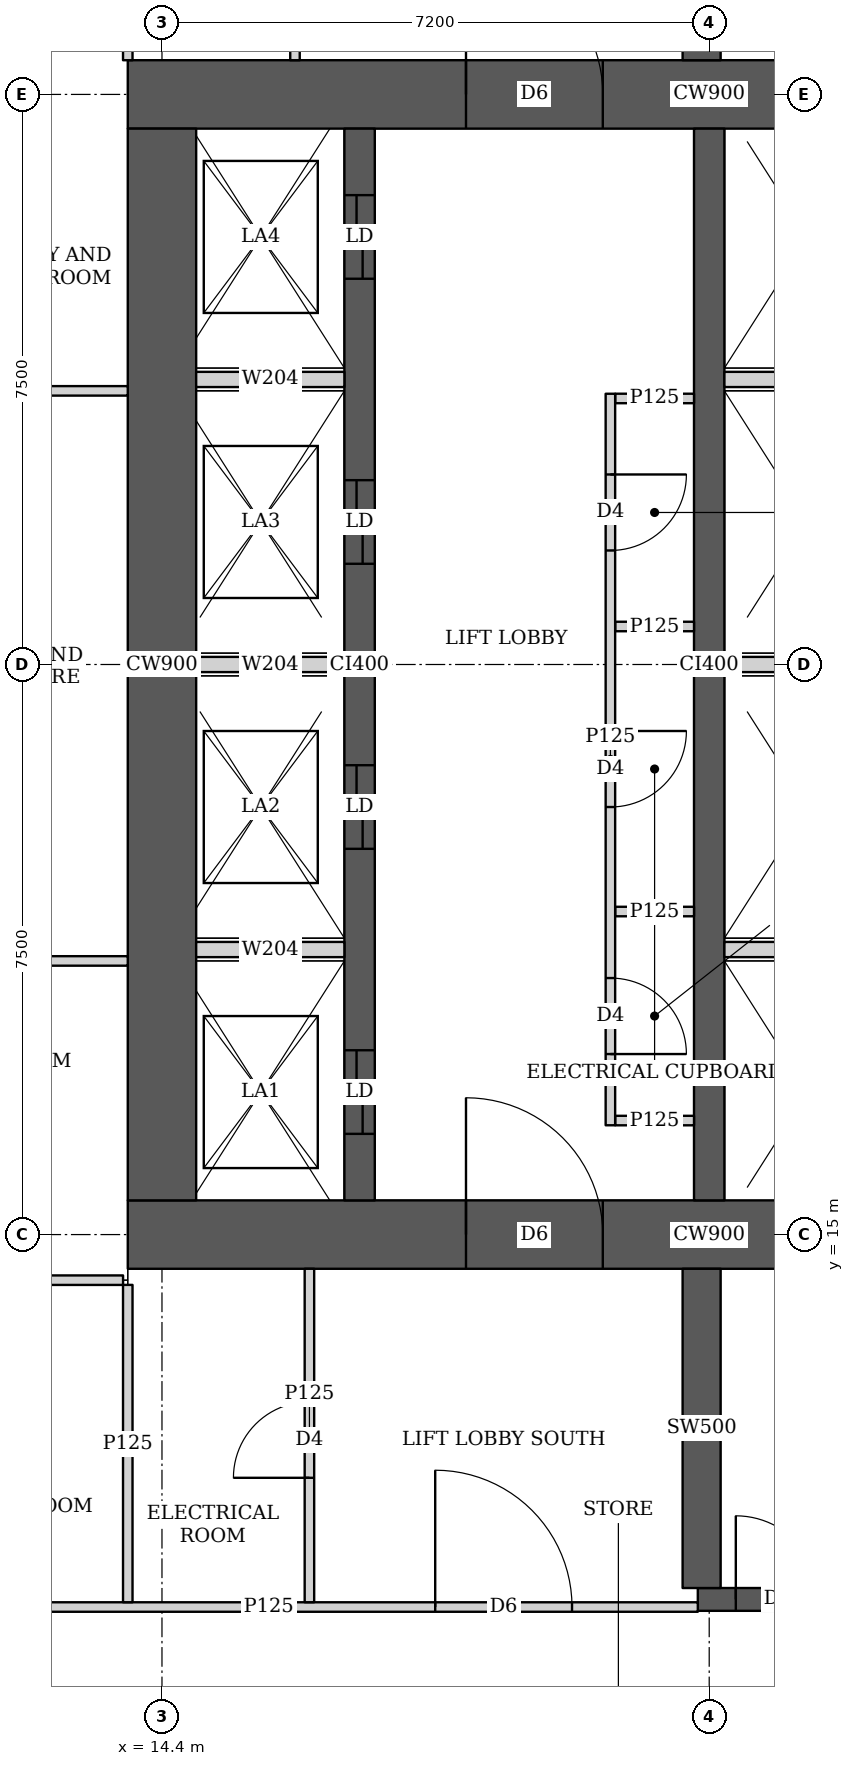
"""IFC4 building model, lengths in metres.
Left out: names, types, materials, properties, quantities, classifications, styles, units other than length and angle.
Written with IfcOpenShell. Run it as: python <this file> out.ifc"""

import sys

from ifc_helpers import new_model, si_unit, direction, frame, frame_2d, origin, place, context, subcontext, project, spatial, rectangle, extrude, element, fill, save


model = new_model("IFC4")
c1 = context("Model", 3, precision=1e-05, world=origin(), true_north=direction((0.0, 1.0)))
c2 = subcontext(c1, "Body", "Model", "MODEL_VIEW")
j1 = project(units=[si_unit("LENGTHUNIT", "METRE"), si_unit("PLANEANGLEUNIT", "RADIAN")], contexts=[c1])
p1 = place(None, origin())
s1 = spatial("IfcSite", under=j1, at=p1, CompositionType="ELEMENT")
p2 = place(p1, origin())
s2 = spatial("IfcBuilding", under=s1, at=p2, CompositionType="ELEMENT")
p3 = place(p2, frame((0.0, 0.0, 77.9)))
s3 = spatial("IfcBuildingStorey", under=s2, at=p3, CompositionType="ELEMENT", Elevation=77.9)
p4 = place(p3, frame((13.95, 15.0, 0.0), z_axis=(0.0, 0.0, 1.0), x_axis=(1.0, 0.0, 0.0)))
e1 = element("IfcWall", 1, at=p4, inside=s3, PredefinedType="SHEAR", context=c2, shape_type="SweptSolid", body=[
    extrude(rectangle(XDim=15.3, YDim=0.9, at=frame_2d((7.65, 0.0))), origin(), (0.0, 0.0, 1.0), 3.75),
])
p5 = place(p4, frame((4.45, 0.0, 0.0)))
e2 = element("IfcOpeningElement", 2, at=p5, cuts=e1, PredefinedType="OPENING", context=c2, shape_type="SweptSolid", body=[
    extrude(rectangle(XDim=1.8, YDim=2.1, at=frame_2d((0.9, 1.05))), frame((0.0, 0.46, 0.0), z_axis=(0.0, -1.0, 0.0), x_axis=(1.0, 0.0, 0.0)), (0.0, 0.0, 1.0), 0.92),
])
p6 = place(p4, frame((10.7, 0.0, 0.0)))
e3 = element("IfcOpeningElement", 3, at=p6, cuts=e1, PredefinedType="OPENING", context=c2, shape_type="SweptSolid", body=[
    extrude(rectangle(XDim=1.1, YDim=2.1, at=frame_2d((0.55, 1.05))), frame((0.0, 0.46, 0.0), z_axis=(0.0, -1.0, 0.0), x_axis=(1.0, 0.0, 0.0)), (0.0, 0.0, 1.0), 0.92),
])
p7 = place(p3, frame((13.95, 30.0, 0.0), z_axis=(0.0, 0.0, 1.0), x_axis=(1.0, 0.0, 0.0)))
e4 = element("IfcWall", 4, at=p7, inside=s3, PredefinedType="SHEAR", context=c2, shape_type="SweptSolid", body=[
    extrude(rectangle(XDim=15.3, YDim=0.9, at=frame_2d((7.65, 0.0))), origin(), (0.0, 0.0, 1.0), 3.75),
])
p8 = place(p7, frame((4.45, 0.0, 0.0)))
e5 = element("IfcOpeningElement", 5, at=p8, cuts=e4, PredefinedType="OPENING", context=c2, shape_type="SweptSolid", body=[
    extrude(rectangle(XDim=1.8, YDim=2.1, at=frame_2d((0.9, 1.05))), frame((0.0, 0.46, 0.0), z_axis=(0.0, -1.0, 0.0), x_axis=(1.0, 0.0, 0.0)), (0.0, 0.0, 1.0), 0.92),
])
p9 = place(p7, frame((10.7, 0.0, 0.0)))
e6 = element("IfcOpeningElement", 6, at=p9, cuts=e4, PredefinedType="OPENING", context=c2, shape_type="SweptSolid", body=[
    extrude(rectangle(XDim=1.1, YDim=2.1, at=frame_2d((0.55, 1.05))), frame((0.0, 0.46, 0.0), z_axis=(0.0, -1.0, 0.0), x_axis=(1.0, 0.0, 0.0)), (0.0, 0.0, 1.0), 0.92),
])
p10 = place(p3, frame((14.4, 15.45, 0.0), z_axis=(0.0, 0.0, 1.0), x_axis=(0.0, 1.0, 0.0)))
e7 = element("IfcWall", 7, at=p10, inside=s3, PredefinedType="SHEAR", context=c2, shape_type="SweptSolid", body=[
    extrude(rectangle(XDim=14.1, YDim=0.9, at=frame_2d((7.05, 0.0))), origin(), (0.0, 0.0, 1.0), 3.75),
])
p11 = place(p3, frame((17.0, 15.45, 0.0), z_axis=(0.0, 0.0, 1.0), x_axis=(0.0, 1.0, 0.0)))
e8 = element("IfcWall", 8, at=p11, inside=s3, PredefinedType="SHEAR", context=c2, shape_type="SweptSolid", body=[
    extrude(rectangle(XDim=14.1, YDim=0.4, at=frame_2d((7.05, 0.0))), origin(), (0.0, 0.0, 1.0), 3.75),
])
p12 = place(p11, frame((0.875, 0.0, 0.0)))
e9 = element("IfcOpeningElement", 9, at=p12, cuts=e8, PredefinedType="OPENING", context=c2, shape_type="SweptSolid", body=[
    extrude(rectangle(XDim=1.1, YDim=2.1, at=frame_2d((0.55, 1.05))), frame((0.0, 0.21, 0.0), z_axis=(0.0, -1.0, 0.0), x_axis=(1.0, 0.0, 0.0)), (0.0, 0.0, 1.0), 0.42),
])
p13 = place(p11, frame((4.625, 0.0, 0.0)))
e10 = element("IfcOpeningElement", 10, at=p13, cuts=e8, PredefinedType="OPENING", context=c2, shape_type="SweptSolid", body=[
    extrude(rectangle(XDim=1.1, YDim=2.1, at=frame_2d((0.55, 1.05))), frame((0.0, 0.21, 0.0), z_axis=(0.0, -1.0, 0.0), x_axis=(1.0, 0.0, 0.0)), (0.0, 0.0, 1.0), 0.42),
])
p14 = place(p11, frame((8.375, 0.0, 0.0)))
e11 = element("IfcOpeningElement", 11, at=p14, cuts=e8, PredefinedType="OPENING", context=c2, shape_type="SweptSolid", body=[
    extrude(rectangle(XDim=1.1, YDim=2.1, at=frame_2d((0.55, 1.05))), frame((0.0, 0.21, 0.0), z_axis=(0.0, -1.0, 0.0), x_axis=(1.0, 0.0, 0.0)), (0.0, 0.0, 1.0), 0.42),
])
p15 = place(p11, frame((12.125, 0.0, 0.0)))
e12 = element("IfcOpeningElement", 12, at=p15, cuts=e8, PredefinedType="OPENING", context=c2, shape_type="SweptSolid", body=[
    extrude(rectangle(XDim=1.1, YDim=2.1, at=frame_2d((0.55, 1.05))), frame((0.0, 0.21, 0.0), z_axis=(0.0, -1.0, 0.0), x_axis=(1.0, 0.0, 0.0)), (0.0, 0.0, 1.0), 0.42),
])
p16 = place(p3, frame((21.6, 15.45, 0.0), z_axis=(0.0, 0.0, 1.0), x_axis=(0.0, 1.0, 0.0)))
e13 = element("IfcWall", 13, at=p16, inside=s3, PredefinedType="SHEAR", context=c2, shape_type="SweptSolid", body=[
    extrude(rectangle(XDim=14.1, YDim=0.4, at=frame_2d((7.05, 0.0))), origin(), (0.0, 0.0, 1.0), 3.75),
])
p17 = place(p3, frame((21.45, 10.2, 0.0), z_axis=(0.0, 0.0, 1.0), x_axis=(1.0, 0.0, 0.0)))
e14 = element("IfcWall", 14, at=p17, inside=s3, PredefinedType="SHEAR", context=c2, shape_type="SweptSolid", body=[
    extrude(rectangle(XDim=7.5, YDim=0.3, at=frame_2d((3.75, 0.0))), origin(), (0.0, 0.0, 1.0), 3.75),
])
p18 = place(p17, frame((0.5, 0.0, 0.0)))
e15 = element("IfcOpeningElement", 15, at=p18, cuts=e14, PredefinedType="OPENING", context=c2, shape_type="SweptSolid", body=[
    extrude(rectangle(XDim=1.1, YDim=2.1, at=frame_2d((0.55, 1.05))), frame((0.0, 0.16, 0.0), z_axis=(0.0, -1.0, 0.0), x_axis=(1.0, 0.0, 0.0)), (0.0, 0.0, 1.0), 0.32),
])
for number, where, z_axis, x_axis in (
    (16, (21.5, 10.35, 0.0), (0.0, 0.0, 1.0), (0.0, 1.0, 0.0)),
    (17, (21.5, 30.45, 0.0), (0.0, 0.0, 1.0), (0.0, 1.0, 0.0)),
):
    element("IfcWall", number, at=place(p3, frame(where, z_axis=z_axis, x_axis=x_axis)), inside=s3, PredefinedType="SHEAR", context=c2, shape_type="SweptSolid", body=[
        extrude(rectangle(XDim=4.2, YDim=0.5, at=frame_2d((2.1, 0.0))), origin(), (0.0, 0.0, 1.0), 3.75),
    ])
p19 = place(p3, frame((10.163, 14.4, 0.0), z_axis=(0.0, 0.0, 1.0), x_axis=(1.0, 0.0, 0.0)))
e18 = element("IfcWall", 18, at=p19, inside=s3, PredefinedType="PARTITIONING", context=c2, shape_type="SweptSolid", body=[
    extrude(rectangle(XDim=3.725, YDim=0.125, at=frame_2d((1.862, 0.0))), origin(), (0.0, 0.0, 1.0), 3.5),
])
for number, where, z_axis, x_axis in (
    (19, (10.163, 18.6, 0.0), (0.0, 0.0, 1.0), (1.0, 0.0, 0.0)),
    (20, (10.163, 26.1, 0.0), (0.0, 0.0, 1.0), (1.0, 0.0, 0.0)),
):
    element("IfcWall", number, at=place(p3, frame(where, z_axis=z_axis, x_axis=x_axis)), inside=s3, PredefinedType="PARTITIONING", context=c2, shape_type="SweptSolid", body=[
        extrude(rectangle(XDim=3.787, YDim=0.125, at=frame_2d((1.894, 0.0))), origin(), (0.0, 0.0, 1.0), 3.5),
    ])
p20 = place(p3, frame((13.95, 10.163, 0.0), z_axis=(0.0, 0.0, 1.0), x_axis=(0.0, 1.0, 0.0)))
e21 = element("IfcWall", 21, at=p20, inside=s3, PredefinedType="PARTITIONING", context=c2, shape_type="SweptSolid", body=[
    extrude(rectangle(XDim=4.175, YDim=0.125, at=frame_2d((2.087, 0.0))), origin(), (0.0, 0.0, 1.0), 3.5),
])
p21 = place(p3, frame((13.95, 30.45, 0.0), z_axis=(0.0, 0.0, 1.0), x_axis=(0.0, 1.0, 0.0)))
e22 = element("IfcWall", 22, at=p21, inside=s3, PredefinedType="PARTITIONING", context=c2, shape_type="SweptSolid", body=[
    extrude(rectangle(XDim=4.387, YDim=0.125, at=frame_2d((2.193, 0.0))), origin(), (0.0, 0.0, 1.0), 3.5),
])
p22 = place(p3, frame((10.163, 10.1, 0.0), z_axis=(0.0, 0.0, 1.0), x_axis=(1.0, 0.0, 0.0)))
e23 = element("IfcWall", 23, at=p22, inside=s3, PredefinedType="PARTITIONING", context=c2, shape_type="SweptSolid", body=[
    extrude(rectangle(XDim=11.287, YDim=0.125, at=frame_2d((5.644, 0.0))), origin(), (0.0, 0.0, 1.0), 3.5),
])
p23 = place(p22, frame((7.832, 0.0, 0.0)))
e24 = element("IfcOpeningElement", 24, at=p23, cuts=e23, PredefinedType="OPENING", context=c2, shape_type="SweptSolid", body=[
    extrude(rectangle(XDim=1.8, YDim=2.1, at=frame_2d((0.9, 1.05))), frame((0.0, 0.073, 0.0), z_axis=(0.0, -1.0, 0.0), x_axis=(1.0, 0.0, 0.0)), (0.0, 0.0, 1.0), 0.145),
])
p24 = place(p3, frame((16.34, 10.163, 0.0), z_axis=(0.0, 0.0, 1.0), x_axis=(0.0, 1.0, 0.0)))
e25 = element("IfcWall", 25, at=p24, inside=s3, PredefinedType="PARTITIONING", context=c2, shape_type="SweptSolid", body=[
    extrude(rectangle(XDim=4.387, YDim=0.125, at=frame_2d((2.193, 0.0))), origin(), (0.0, 0.0, 1.0), 3.5),
])
p25 = place(p24, frame((1.637, 0.0, 0.0)))
e26 = element("IfcOpeningElement", 26, at=p25, cuts=e25, PredefinedType="OPENING", context=c2, shape_type="SweptSolid", body=[
    extrude(rectangle(XDim=1.0, YDim=2.1, at=frame_2d((0.5, 1.05))), frame((0.0, 0.073, 0.0), z_axis=(0.0, -1.0, 0.0), x_axis=(1.0, 0.0, 0.0)), (0.0, 0.0, 1.0), 0.145),
])
p26 = place(p3, frame((16.15, 30.45, 0.0), z_axis=(0.0, 0.0, 1.0), x_axis=(0.0, 1.0, 0.0)))
e27 = element("IfcWall", 27, at=p26, inside=s3, PredefinedType="PARTITIONING", context=c2, shape_type="SweptSolid", body=[
    extrude(rectangle(XDim=4.387, YDim=0.125, at=frame_2d((2.193, 0.0))), origin(), (0.0, 0.0, 1.0), 3.5),
])
p27 = place(p26, frame((1.75, 0.0, 0.0)))
e28 = element("IfcOpeningElement", 28, at=p27, cuts=e27, PredefinedType="OPENING", context=c2, shape_type="SweptSolid", body=[
    extrude(rectangle(XDim=1.0, YDim=2.1, at=frame_2d((0.5, 1.05))), frame((0.0, 0.073, 0.0), z_axis=(0.0, -1.0, 0.0), x_axis=(1.0, 0.0, 0.0)), (0.0, 0.0, 1.0), 0.145),
])
p28 = place(p3, frame((20.3, 16.438, 0.0), z_axis=(0.0, 0.0, 1.0), x_axis=(0.0, 1.0, 0.0)))
e29 = element("IfcWall", 29, at=p28, inside=s3, PredefinedType="PARTITIONING", context=c2, shape_type="SweptSolid", body=[
    extrude(rectangle(XDim=9.624, YDim=0.125, at=frame_2d((4.812, 0.0))), origin(), (0.0, 0.0, 1.0), 3.5),
])
p29 = place(p28, frame((0.937, 0.0, 0.0)))
e30 = element("IfcOpeningElement", 30, at=p29, cuts=e29, PredefinedType="OPENING", context=c2, shape_type="SweptSolid", body=[
    extrude(rectangle(XDim=1.0, YDim=2.1, at=frame_2d((0.5, 1.05))), frame((0.0, 0.073, 0.0), z_axis=(0.0, -1.0, 0.0), x_axis=(1.0, 0.0, 0.0)), (0.0, 0.0, 1.0), 0.145),
])
p30 = place(p28, frame((4.187, 0.0, 0.0)))
e31 = element("IfcOpeningElement", 31, at=p30, cuts=e29, PredefinedType="OPENING", context=c2, shape_type="SweptSolid", body=[
    extrude(rectangle(XDim=1.0, YDim=2.1, at=frame_2d((0.5, 1.05))), frame((0.0, 0.073, 0.0), z_axis=(0.0, -1.0, 0.0), x_axis=(1.0, 0.0, 0.0)), (0.0, 0.0, 1.0), 0.145),
])
p31 = place(p28, frame((7.562, 0.0, 0.0)))
e32 = element("IfcOpeningElement", 32, at=p31, cuts=e29, PredefinedType="OPENING", context=c2, shape_type="SweptSolid", body=[
    extrude(rectangle(XDim=1.0, YDim=2.1, at=frame_2d((0.5, 1.05))), frame((0.0, 0.073, 0.0), z_axis=(0.0, -1.0, 0.0), x_axis=(1.0, 0.0, 0.0)), (0.0, 0.0, 1.0), 0.145),
])
for number, where, z_axis, x_axis in (
    (33, (20.363, 16.5, 0.0), (0.0, 0.0, 1.0), (1.0, 0.0, 0.0)),
    (34, (20.363, 26.0, 0.0), (0.0, 0.0, 1.0), (1.0, 0.0, 0.0)),
    (35, (20.363, 19.25, 0.0), (0.0, 0.0, 1.0), (1.0, 0.0, 0.0)),
    (36, (20.363, 23.0, 0.0), (0.0, 0.0, 1.0), (1.0, 0.0, 0.0)),
):
    element("IfcWall", number, at=place(p3, frame(where, z_axis=z_axis, x_axis=x_axis)), inside=s3, PredefinedType="PARTITIONING", context=c2, shape_type="SweptSolid", body=[
        extrude(rectangle(XDim=1.037, YDim=0.125, at=frame_2d((0.519, 0.0))), origin(), (0.0, 0.0, 1.0), 3.5),
    ])
p32 = place(p3, frame((14.85, 18.75, 0.0), z_axis=(0.0, 0.0, 1.0), x_axis=(1.0, 0.0, 0.0)))
e37 = element("IfcWall", 37, at=p32, inside=s3, PredefinedType="SOLIDWALL", context=c2, shape_type="SweptSolid", body=[
    extrude(rectangle(XDim=1.95, YDim=0.2, at=frame_2d((0.975, 0.0))), origin(), (0.0, 0.0, 1.0), 3.5),
])
p33 = place(p3, frame((21.8, 18.75, 0.0), z_axis=(0.0, 0.0, 1.0), x_axis=(1.0, 0.0, 0.0)))
e38 = element("IfcWall", 38, at=p33, inside=s3, PredefinedType="SOLIDWALL", context=c2, shape_type="SweptSolid", body=[
    extrude(rectangle(XDim=2.2, YDim=0.2, at=frame_2d((1.1, 0.0))), origin(), (0.0, 0.0, 1.0), 3.5),
])
p34 = place(p3, frame((14.85, 22.5, 0.0), z_axis=(0.0, 0.0, 1.0), x_axis=(1.0, 0.0, 0.0)))
e39 = element("IfcWall", 39, at=p34, inside=s3, PredefinedType="SOLIDWALL", context=c2, shape_type="SweptSolid", body=[
    extrude(rectangle(XDim=1.95, YDim=0.2, at=frame_2d((0.975, 0.0))), origin(), (0.0, 0.0, 1.0), 3.5),
])
p35 = place(p3, frame((21.8, 22.5, 0.0), z_axis=(0.0, 0.0, 1.0), x_axis=(1.0, 0.0, 0.0)))
e40 = element("IfcWall", 40, at=p35, inside=s3, PredefinedType="SOLIDWALL", context=c2, shape_type="SweptSolid", body=[
    extrude(rectangle(XDim=2.2, YDim=0.2, at=frame_2d((1.1, 0.0))), origin(), (0.0, 0.0, 1.0), 3.5),
])
p36 = place(p3, frame((14.85, 26.25, 0.0), z_axis=(0.0, 0.0, 1.0), x_axis=(1.0, 0.0, 0.0)))
e41 = element("IfcWall", 41, at=p36, inside=s3, PredefinedType="SOLIDWALL", context=c2, shape_type="SweptSolid", body=[
    extrude(rectangle(XDim=1.95, YDim=0.2, at=frame_2d((0.975, 0.0))), origin(), (0.0, 0.0, 1.0), 3.5),
])
p37 = place(p3, frame((21.8, 26.25, 0.0), z_axis=(0.0, 0.0, 1.0), x_axis=(1.0, 0.0, 0.0)))
e42 = element("IfcWall", 42, at=p37, inside=s3, PredefinedType="SOLIDWALL", context=c2, shape_type="SweptSolid", body=[
    extrude(rectangle(XDim=2.2, YDim=0.2, at=frame_2d((1.1, 0.0))), origin(), (0.0, 0.0, 1.0), 3.5),
])
p38 = place(p25, origin())
e43 = element("IfcDoor", 43, at=p38, inside=s3, OperationType="SINGLE_SWING_LEFT", PredefinedType="DOOR", context=c2, shape_type="SweptSolid", body=[
    extrude(rectangle(XDim=1.0, YDim=2.1, at=frame_2d((0.5, 1.05))), frame((0.0, 0.025, 0.0), z_axis=(0.0, -1.0, 0.0), x_axis=(1.0, 0.0, 0.0)), (0.0, 0.0, 1.0), 0.05),
])
fill(e26, e43)
p39 = place(p23, origin())
e44 = element("IfcDoor", 44, at=p39, inside=s3, OperationType="DOUBLE_DOOR_SINGLE_SWING", PredefinedType="DOOR", context=c2, shape_type="SweptSolid", body=[
    extrude(rectangle(XDim=1.8, YDim=2.1, at=frame_2d((0.9, 1.05))), frame((0.0, 0.025, 0.0), z_axis=(0.0, -1.0, 0.0), x_axis=(1.0, 0.0, 0.0)), (0.0, 0.0, 1.0), 0.05),
])
fill(e24, e44)
p40 = place(p29, origin())
e45 = element("IfcDoor", 45, at=p40, inside=s3, OperationType="SINGLE_SWING_RIGHT", PredefinedType="DOOR", context=c2, shape_type="SweptSolid", body=[
    extrude(rectangle(XDim=1.0, YDim=2.1, at=frame_2d((0.5, 1.05))), frame((0.0, 0.025, 0.0), z_axis=(0.0, -1.0, 0.0), x_axis=(1.0, 0.0, 0.0)), (0.0, 0.0, 1.0), 0.05),
])
fill(e30, e45)
p41 = place(p30, origin())
e46 = element("IfcDoor", 46, at=p41, inside=s3, OperationType="SINGLE_SWING_LEFT", PredefinedType="DOOR", context=c2, shape_type="SweptSolid", body=[
    extrude(rectangle(XDim=1.0, YDim=2.1, at=frame_2d((0.5, 1.05))), frame((0.0, 0.025, 0.0), z_axis=(0.0, -1.0, 0.0), x_axis=(1.0, 0.0, 0.0)), (0.0, 0.0, 1.0), 0.05),
])
fill(e31, e46)
p42 = place(p31, origin())
e47 = element("IfcDoor", 47, at=p42, inside=s3, OperationType="SINGLE_SWING_LEFT", PredefinedType="DOOR", context=c2, shape_type="SweptSolid", body=[
    extrude(rectangle(XDim=1.0, YDim=2.1, at=frame_2d((0.5, 1.05))), frame((0.0, 0.025, 0.0), z_axis=(0.0, -1.0, 0.0), x_axis=(1.0, 0.0, 0.0)), (0.0, 0.0, 1.0), 0.05),
])
fill(e32, e47)
p43 = place(p5, origin())
e48 = element("IfcDoor", 48, at=p43, inside=s3, OperationType="DOUBLE_DOOR_SINGLE_SWING", PredefinedType="DOOR", context=c2, shape_type="SweptSolid", body=[
    extrude(rectangle(XDim=1.8, YDim=2.1, at=frame_2d((0.9, 1.05))), frame((0.0, 0.025, 0.0), z_axis=(0.0, -1.0, 0.0), x_axis=(1.0, 0.0, 0.0)), (0.0, 0.0, 1.0), 0.05),
])
fill(e2, e48)
p44 = place(p8, origin())
e49 = element("IfcDoor", 49, at=p44, inside=s3, OperationType="DOUBLE_DOOR_SINGLE_SWING", PredefinedType="DOOR", context=c2, shape_type="SweptSolid", body=[
    extrude(rectangle(XDim=1.8, YDim=2.1, at=frame_2d((0.9, 1.05))), frame((0.0, 0.025, 0.0), z_axis=(0.0, -1.0, 0.0), x_axis=(1.0, 0.0, 0.0)), (0.0, 0.0, 1.0), 0.05),
])
fill(e5, e49)
p45 = place(p12, origin())
e50 = element("IfcDoor", 50, at=p45, inside=s3, OperationType="DOUBLE_DOOR_SLIDING", PredefinedType="DOOR", context=c2, shape_type="SweptSolid", body=[
    extrude(rectangle(XDim=1.1, YDim=2.1, at=frame_2d((0.55, 1.05))), frame((0.0, 0.025, 0.0), z_axis=(0.0, -1.0, 0.0), x_axis=(1.0, 0.0, 0.0)), (0.0, 0.0, 1.0), 0.05),
])
fill(e9, e50)
p46 = place(p13, origin())
e51 = element("IfcDoor", 51, at=p46, inside=s3, OperationType="DOUBLE_DOOR_SLIDING", PredefinedType="DOOR", context=c2, shape_type="SweptSolid", body=[
    extrude(rectangle(XDim=1.1, YDim=2.1, at=frame_2d((0.55, 1.05))), frame((0.0, 0.025, 0.0), z_axis=(0.0, -1.0, 0.0), x_axis=(1.0, 0.0, 0.0)), (0.0, 0.0, 1.0), 0.05),
])
fill(e10, e51)
p47 = place(p14, origin())
e52 = element("IfcDoor", 52, at=p47, inside=s3, OperationType="DOUBLE_DOOR_SLIDING", PredefinedType="DOOR", context=c2, shape_type="SweptSolid", body=[
    extrude(rectangle(XDim=1.1, YDim=2.1, at=frame_2d((0.55, 1.05))), frame((0.0, 0.025, 0.0), z_axis=(0.0, -1.0, 0.0), x_axis=(1.0, 0.0, 0.0)), (0.0, 0.0, 1.0), 0.05),
])
fill(e11, e52)
p48 = place(p15, origin())
e53 = element("IfcDoor", 53, at=p48, inside=s3, OperationType="DOUBLE_DOOR_SLIDING", PredefinedType="DOOR", context=c2, shape_type="SweptSolid", body=[
    extrude(rectangle(XDim=1.1, YDim=2.1, at=frame_2d((0.55, 1.05))), frame((0.0, 0.025, 0.0), z_axis=(0.0, -1.0, 0.0), x_axis=(1.0, 0.0, 0.0)), (0.0, 0.0, 1.0), 0.05),
])
fill(e12, e53)
p49 = place(p18, origin())
e54 = element("IfcDoor", 54, at=p49, inside=s3, OperationType="SINGLE_SWING_LEFT", PredefinedType="DOOR", context=c2, shape_type="SweptSolid", body=[
    extrude(rectangle(XDim=1.1, YDim=2.1, at=frame_2d((0.55, 1.05))), frame((0.0, 0.025, 0.0), z_axis=(0.0, -1.0, 0.0), x_axis=(1.0, 0.0, 0.0)), (0.0, 0.0, 1.0), 0.05),
])
fill(e15, e54)
save(model, sys.argv[1])
